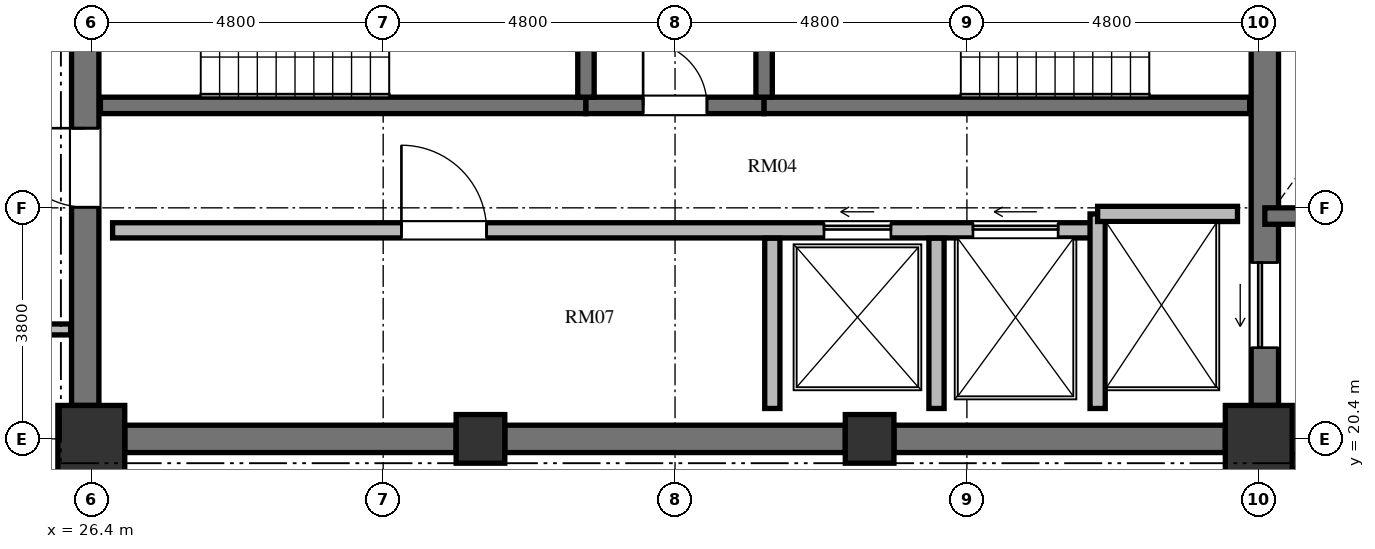
"""IFC4 building model, lengths in metres.
Left out: names, types, materials, properties, quantities, classifications, styles, units other than length and angle.
Written with IfcOpenShell. Run it as: python <this file> out.ifc"""

import sys

from ifc_helpers import new_model, si_unit, direction, frame, frame_2d, origin, origin_2d, place, context, subcontext, project, spatial, rectangle, extrude, element, fill, save


model = new_model("IFC4")
c1 = context("Model", 3, precision=1e-05, world=origin(), true_north=direction((0.0, 1.0)))
c2 = subcontext(c1, "Body", "Model", "MODEL_VIEW")
j1 = project(units=[si_unit("LENGTHUNIT", "METRE"), si_unit("PLANEANGLEUNIT", "RADIAN")], contexts=[c1])
p1 = place(None, origin())
s1 = spatial("IfcSite", under=j1, at=p1, CompositionType="ELEMENT")
p2 = place(p1, origin())
s2 = spatial("IfcBuilding", under=s1, at=p2, CompositionType="ELEMENT")
p3 = place(p2, frame((0.0, 0.0, 273.264)))
s3 = spatial("IfcBuildingStorey", under=s2, at=p3, CompositionType="ELEMENT", Elevation=273.264)
p4 = place(p3, frame((26.4, 20.4, 0.0), z_axis=(0.0, 0.0, 1.0), x_axis=(1.0, 0.0, 0.0)))
e1 = element("IfcColumn", 1, at=p4, inside=s3, PredefinedType="COLUMN", context=c2, shape_type="SweptSolid", body=[
    extrude(rectangle(XDim=1.1, YDim=1.1, at=origin_2d()), origin(), (0.0, 0.0, 1.0), 3.648),
])
for number, where, z_axis, x_axis in (
    (2, (32.8, 20.4, 0.0), (0.0, 0.0, 1.0), (1.0, 0.0, 0.0)),
    (3, (39.2, 20.4, 0.0), (0.0, 0.0, 1.0), (1.0, 0.0, 0.0)),
):
    element("IfcColumn", number, at=place(p3, frame(where, z_axis=z_axis, x_axis=x_axis)), inside=s3, PredefinedType="COLUMN", context=c2, shape_type="SweptSolid", body=[
        extrude(rectangle(XDim=0.8, YDim=0.8, at=origin_2d()), origin(), (0.0, 0.0, 1.0), 3.648),
    ])
p5 = place(p3, frame((45.6, 20.4, 0.0), z_axis=(0.0, 0.0, 1.0), x_axis=(1.0, 0.0, 0.0)))
e4 = element("IfcColumn", 4, at=p5, inside=s3, PredefinedType="COLUMN", context=c2, shape_type="SweptSolid", body=[
    extrude(rectangle(XDim=1.1, YDim=1.1, at=origin_2d()), origin(), (0.0, 0.0, 1.0), 3.648),
])
p6 = place(p3, frame((26.3, 20.95, 0.0), z_axis=(0.0, 0.0, 1.0), x_axis=(0.0, 1.0, 0.0)))
e5 = element("IfcWall", 5, at=p6, inside=s3, PredefinedType="SHEAR", context=c2, shape_type="SweptSolid", body=[
    extrude(rectangle(XDim=14.1, YDim=0.45, at=frame_2d((7.05, 0.0))), origin(), (0.0, 0.0, 1.0), 3.648),
])
p7 = place(p6, frame((6.5, 0.0, 0.0)))
e6 = element("IfcOpeningElement", 6, at=p7, cuts=e5, PredefinedType="OPENING", context=c2, shape_type="SweptSolid", body=[
    extrude(rectangle(XDim=1.2, YDim=2.15, at=frame_2d((0.6, 1.075))), frame((0.0, 0.235, 0.0), z_axis=(0.0, -1.0, 0.0), x_axis=(1.0, 0.0, 0.0)), (0.0, 0.0, 1.0), 0.47),
])
p8 = place(p6, frame((9.6, 0.0, 0.0)))
e7 = element("IfcOpeningElement", 7, at=p8, cuts=e5, PredefinedType="OPENING", context=c2, shape_type="SweptSolid", body=[
    extrude(rectangle(XDim=1.3, YDim=2.2, at=frame_2d((0.65, 1.1))), frame((0.0, 0.235, 0.0), z_axis=(0.0, -1.0, 0.0), x_axis=(1.0, 0.0, 0.0)), (0.0, 0.0, 1.0), 0.47),
])
p9 = place(p6, frame((3.26, 0.0, 0.0)))
e8 = element("IfcOpeningElement", 8, at=p9, cuts=e5, PredefinedType="OPENING", context=c2, shape_type="SweptSolid", body=[
    extrude(rectangle(XDim=1.3, YDim=2.2, at=frame_2d((0.65, 1.1))), frame((0.0, 0.235, 0.0), z_axis=(0.0, -1.0, 0.0), x_axis=(1.0, 0.0, 0.0)), (0.0, 0.0, 1.0), 0.47),
])
p10 = place(p3, frame((45.7, 20.95, 0.0), z_axis=(0.0, 0.0, 1.0), x_axis=(0.0, 1.0, 0.0)))
e9 = element("IfcWall", 9, at=p10, inside=s3, PredefinedType="SHEAR", context=c2, shape_type="SweptSolid", body=[
    extrude(rectangle(XDim=14.1, YDim=0.45, at=frame_2d((7.05, 0.0))), origin(), (0.0, 0.0, 1.0), 3.648),
])
p11 = place(p10, frame((11.75, 0.0, 0.0)))
e10 = element("IfcOpeningElement", 10, at=p11, cuts=e9, PredefinedType="OPENING", context=c2, shape_type="SweptSolid", body=[
    extrude(rectangle(XDim=1.4, YDim=2.3, at=frame_2d((0.7, 1.15))), frame((0.0, 0.235, 0.0), z_axis=(0.0, -1.0, 0.0), x_axis=(1.0, 0.0, 0.0)), (0.0, 0.0, 1.0), 0.47),
])
p12 = place(p10, frame((0.95, 0.0, 0.0)))
e11 = element("IfcOpeningElement", 11, at=p12, cuts=e9, PredefinedType="OPENING", context=c2, shape_type="SweptSolid", body=[
    extrude(rectangle(XDim=1.4, YDim=2.3, at=frame_2d((0.7, 1.15))), frame((0.0, 0.235, 0.0), z_axis=(0.0, -1.0, 0.0), x_axis=(1.0, 0.0, 0.0)), (0.0, 0.0, 1.0), 0.47),
])
p13 = place(p3, frame((26.95, 20.4, 0.0), z_axis=(0.0, 0.0, 1.0), x_axis=(1.0, 0.0, 0.0)))
e12 = element("IfcWall", 12, at=p13, inside=s3, PredefinedType="SHEAR", context=c2, shape_type="SweptSolid", body=[
    extrude(rectangle(XDim=5.45, YDim=0.45, at=frame_2d((2.725, 0.0))), origin(), (0.0, 0.0, 1.0), 3.648),
])
p14 = place(p3, frame((33.2, 20.4, 0.0), z_axis=(0.0, 0.0, 1.0), x_axis=(1.0, 0.0, 0.0)))
e13 = element("IfcWall", 13, at=p14, inside=s3, PredefinedType="SHEAR", context=c2, shape_type="SweptSolid", body=[
    extrude(rectangle(XDim=5.6, YDim=0.45, at=frame_2d((2.8, 0.0))), origin(), (0.0, 0.0, 1.0), 3.648),
])
p15 = place(p3, frame((39.6, 20.4, 0.0), z_axis=(0.0, 0.0, 1.0), x_axis=(1.0, 0.0, 0.0)))
e14 = element("IfcWall", 14, at=p15, inside=s3, PredefinedType="SHEAR", context=c2, shape_type="SweptSolid", body=[
    extrude(rectangle(XDim=5.45, YDim=0.45, at=frame_2d((2.725, 0.0))), origin(), (0.0, 0.0, 1.0), 3.648),
])
p16 = place(p3, frame((26.55, 25.885, 0.0), z_axis=(0.0, 0.0, 1.0), x_axis=(1.0, 0.0, 0.0)))
e15 = element("IfcWall", 15, at=p16, inside=s3, PredefinedType="SHEAR", context=c2, shape_type="SweptSolid", body=[
    extrude(rectangle(XDim=7.985, YDim=0.27, at=frame_2d((3.992, 0.0))), origin(), (0.0, 0.0, 1.0), 3.648),
])
p17 = place(p3, frame((34.535, 25.885, 0.0), z_axis=(0.0, 0.0, 1.0), x_axis=(1.0, 0.0, 0.0)))
e16 = element("IfcWall", 16, at=p17, inside=s3, PredefinedType="SHEAR", context=c2, shape_type="SweptSolid", body=[
    extrude(rectangle(XDim=2.93, YDim=0.27, at=frame_2d((1.465, 0.0))), origin(), (0.0, 0.0, 1.0), 3.648),
])
p18 = place(p17, frame((0.94, 0.0, 0.0)))
e17 = element("IfcOpeningElement", 17, at=p18, cuts=e16, PredefinedType="OPENING", context=c2, shape_type="SweptSolid", body=[
    extrude(rectangle(XDim=1.05, YDim=2.15, at=frame_2d((0.525, 1.075))), frame((0.0, 0.145, 0.0), z_axis=(0.0, -1.0, 0.0), x_axis=(1.0, 0.0, 0.0)), (0.0, 0.0, 1.0), 0.29),
])
p19 = place(p3, frame((37.465, 25.885, 0.0), z_axis=(0.0, 0.0, 1.0), x_axis=(1.0, 0.0, 0.0)))
e18 = element("IfcWall", 18, at=p19, inside=s3, PredefinedType="SHEAR", context=c2, shape_type="SweptSolid", body=[
    extrude(rectangle(XDim=7.985, YDim=0.27, at=frame_2d((3.992, 0.0))), origin(), (0.0, 0.0, 1.0), 3.648),
])
for number, where, z_axis, x_axis in (
    (19, (34.535, 26.02, 0.0), (0.0, 0.0, 1.0), (0.0, 1.0, 0.0)),
    (20, (37.465, 26.02, 0.0), (0.0, 0.0, 1.0), (0.0, 1.0, 0.0)),
):
    element("IfcWall", number, at=place(p3, frame(where, z_axis=z_axis, x_axis=x_axis)), inside=s3, PredefinedType="SHEAR", context=c2, shape_type="SweptSolid", body=[
        extrude(rectangle(XDim=4.08, YDim=0.27, at=frame_2d((2.04, 0.0))), origin(), (0.0, 0.0, 1.0), 3.648),
    ])
p20 = place(p3, frame((26.75, 23.83, 0.0), z_axis=(0.0, 0.0, 1.0), x_axis=(1.0, 0.0, 0.0)))
e21 = element("IfcWall", 21, at=p20, inside=s3, PredefinedType="SOLIDWALL", context=c2, shape_type="SweptSolid", body=[
    extrude(rectangle(XDim=16.2, YDim=0.25, at=frame_2d((8.1, 0.0))), origin(), (0.0, 0.0, 1.0), 3.448),
])
p21 = place(p20, frame((4.75, 0.0, 0.0)))
e22 = element("IfcOpeningElement", 22, at=p21, cuts=e21, PredefinedType="OPENING", context=c2, shape_type="SweptSolid", body=[
    extrude(rectangle(XDim=1.4, YDim=2.2, at=frame_2d((0.7, 1.1))), frame((0.0, 0.135, 0.0), z_axis=(0.0, -1.0, 0.0), x_axis=(1.0, 0.0, 0.0)), (0.0, 0.0, 1.0), 0.27),
])
p22 = place(p20, frame((11.7, 0.0, 0.0)))
e23 = element("IfcOpeningElement", 23, at=p22, cuts=e21, PredefinedType="OPENING", context=c2, shape_type="SweptSolid", body=[
    extrude(rectangle(XDim=1.1, YDim=2.2, at=frame_2d((0.55, 1.1))), frame((0.0, 0.135, 0.0), z_axis=(0.0, -1.0, 0.0), x_axis=(1.0, 0.0, 0.0)), (0.0, 0.0, 1.0), 0.27),
])
p23 = place(p20, frame((14.15, 0.0, 0.0)))
e24 = element("IfcOpeningElement", 24, at=p23, cuts=e21, PredefinedType="OPENING", context=c2, shape_type="SweptSolid", body=[
    extrude(rectangle(XDim=1.4, YDim=2.3, at=frame_2d((0.7, 1.15))), frame((0.0, 0.135, 0.0), z_axis=(0.0, -1.0, 0.0), x_axis=(1.0, 0.0, 0.0)), (0.0, 0.0, 1.0), 0.27),
])
p24 = place(p3, frame((42.95, 20.9, 0.0), z_axis=(0.0, 0.0, 1.0), x_axis=(0.0, 1.0, 0.0)))
e25 = element("IfcWall", 25, at=p24, inside=s3, PredefinedType="SOLIDWALL", context=c2, shape_type="SweptSolid", body=[
    extrude(rectangle(XDim=3.2, YDim=0.25, at=frame_2d((1.6, 0.0))), origin(), (0.0, 0.0, 1.0), 3.448),
])
p25 = place(p3, frame((42.95, 24.1, 0.0), z_axis=(0.0, 0.0, 1.0), x_axis=(1.0, 0.0, 0.0)))
e26 = element("IfcWall", 26, at=p25, inside=s3, PredefinedType="SOLIDWALL", context=c2, shape_type="SweptSolid", body=[
    extrude(rectangle(XDim=2.3, YDim=0.25, at=frame_2d((1.15, 0.0))), origin(), (0.0, 0.0, 1.0), 3.448),
])
for number, where, z_axis, x_axis in (
    (27, (37.6, 20.9, 0.0), (0.0, 0.0, 1.0), (0.0, 1.0, 0.0)),
    (28, (40.3, 20.9, 0.0), (0.0, 0.0, 1.0), (0.0, 1.0, 0.0)),
):
    element("IfcWall", number, at=place(p3, frame(where, z_axis=z_axis, x_axis=x_axis)), inside=s3, PredefinedType="SOLIDWALL", context=c2, shape_type="SweptSolid", body=[
        extrude(rectangle(XDim=2.8, YDim=0.25, at=frame_2d((1.4, 0.0))), origin(), (0.0, 0.0, 1.0), 3.448),
    ])
p26 = place(p3, frame((45.7, 24.065, 0.0), z_axis=(0.0, 0.0, 1.0), x_axis=(1.0, 0.0, 0.0)))
e29 = element("IfcWall", 29, at=p26, inside=s3, PredefinedType="SHEAR", context=c2, shape_type="SweptSolid", body=[
    extrude(rectangle(XDim=4.715, YDim=0.27, at=frame_2d((2.357, 0.0))), origin(), (0.0, 0.0, 1.0), 3.648),
])
p27 = place(p3, frame((45.7, 20.02, 0.0), z_axis=(0.0, 0.0, 1.0), x_axis=(1.0, 0.0, 0.0)))
e30 = element("IfcWall", 30, at=p27, inside=s3, PredefinedType="SOLIDWALL", context=c2, shape_type="SweptSolid", body=[
    extrude(rectangle(XDim=4.715, YDim=0.25, at=frame_2d((2.357, 0.0))), origin(), (0.0, 0.0, 1.0), 3.448),
])
p28 = place(p3, frame((26.06, 22.2, 0.0), z_axis=(0.0, 0.0, 1.0), x_axis=(-1.0, 0.0, 0.0)))
e31 = element("IfcWall", 31, at=p28, inside=s3, PredefinedType="PARTITIONING", context=c2, shape_type="SweptSolid", body=[
    extrude(rectangle(XDim=2.35, YDim=0.18, at=frame_2d((1.175, 0.0))), origin(), (0.0, 0.0, 1.0), 3.448),
])
p29 = place(p18, origin())
e32 = element("IfcDoor", 32, at=p29, inside=s3, OperationType="SINGLE_SWING_LEFT", PredefinedType="DOOR", context=c2, shape_type="SweptSolid", body=[
    extrude(rectangle(XDim=1.05, YDim=2.15, at=frame_2d((0.525, 1.075))), frame((0.0, 0.025, 0.0), z_axis=(0.0, -1.0, 0.0), x_axis=(1.0, 0.0, 0.0)), (0.0, 0.0, 1.0), 0.05),
])
fill(e17, e32)
p30 = place(p9, origin())
e33 = element("IfcDoor", 33, at=p30, inside=s3, OperationType="SINGLE_SWING_RIGHT", PredefinedType="DOOR", context=c2, shape_type="SweptSolid", body=[
    extrude(rectangle(XDim=1.3, YDim=2.2, at=frame_2d((0.65, 1.1))), frame((0.0, 0.025, 0.0), z_axis=(0.0, -1.0, 0.0), x_axis=(1.0, 0.0, 0.0)), (0.0, 0.0, 1.0), 0.05),
])
fill(e8, e33)
p31 = place(p21, origin())
e34 = element("IfcDoor", 34, at=p31, inside=s3, OperationType="SINGLE_SWING_LEFT", PredefinedType="DOOR", context=c2, shape_type="SweptSolid", body=[
    extrude(rectangle(XDim=1.4, YDim=2.2, at=frame_2d((0.7, 1.1))), frame((0.0, 0.025, 0.0), z_axis=(0.0, -1.0, 0.0), x_axis=(1.0, 0.0, 0.0)), (0.0, 0.0, 1.0), 0.05),
])
fill(e22, e34)
p32 = place(p22, origin())
e35 = element("IfcDoor", 35, at=p32, inside=s3, OperationType="SLIDING_TO_LEFT", PredefinedType="DOOR", context=c2, shape_type="SweptSolid", body=[
    extrude(rectangle(XDim=1.1, YDim=2.2, at=frame_2d((0.55, 1.1))), frame((0.0, 0.025, 0.0), z_axis=(0.0, -1.0, 0.0), x_axis=(1.0, 0.0, 0.0)), (0.0, 0.0, 1.0), 0.05),
])
fill(e23, e35)
p33 = place(p12, origin())
e36 = element("IfcDoor", 36, at=p33, inside=s3, OperationType="SLIDING_TO_LEFT", PredefinedType="DOOR", context=c2, shape_type="SweptSolid", body=[
    extrude(rectangle(XDim=1.4, YDim=2.3, at=frame_2d((0.7, 1.15))), frame((0.0, 0.025, 0.0), z_axis=(0.0, -1.0, 0.0), x_axis=(1.0, 0.0, 0.0)), (0.0, 0.0, 1.0), 0.05),
])
fill(e11, e36)
p34 = place(p23, origin())
e37 = element("IfcDoor", 37, at=p34, inside=s3, OperationType="SLIDING_TO_LEFT", PredefinedType="DOOR", context=c2, shape_type="SweptSolid", body=[
    extrude(rectangle(XDim=1.4, YDim=2.3, at=frame_2d((0.7, 1.15))), frame((0.0, 0.025, 0.0), z_axis=(0.0, -1.0, 0.0), x_axis=(1.0, 0.0, 0.0)), (0.0, 0.0, 1.0), 0.05),
])
fill(e24, e37)
save(model, sys.argv[1])
